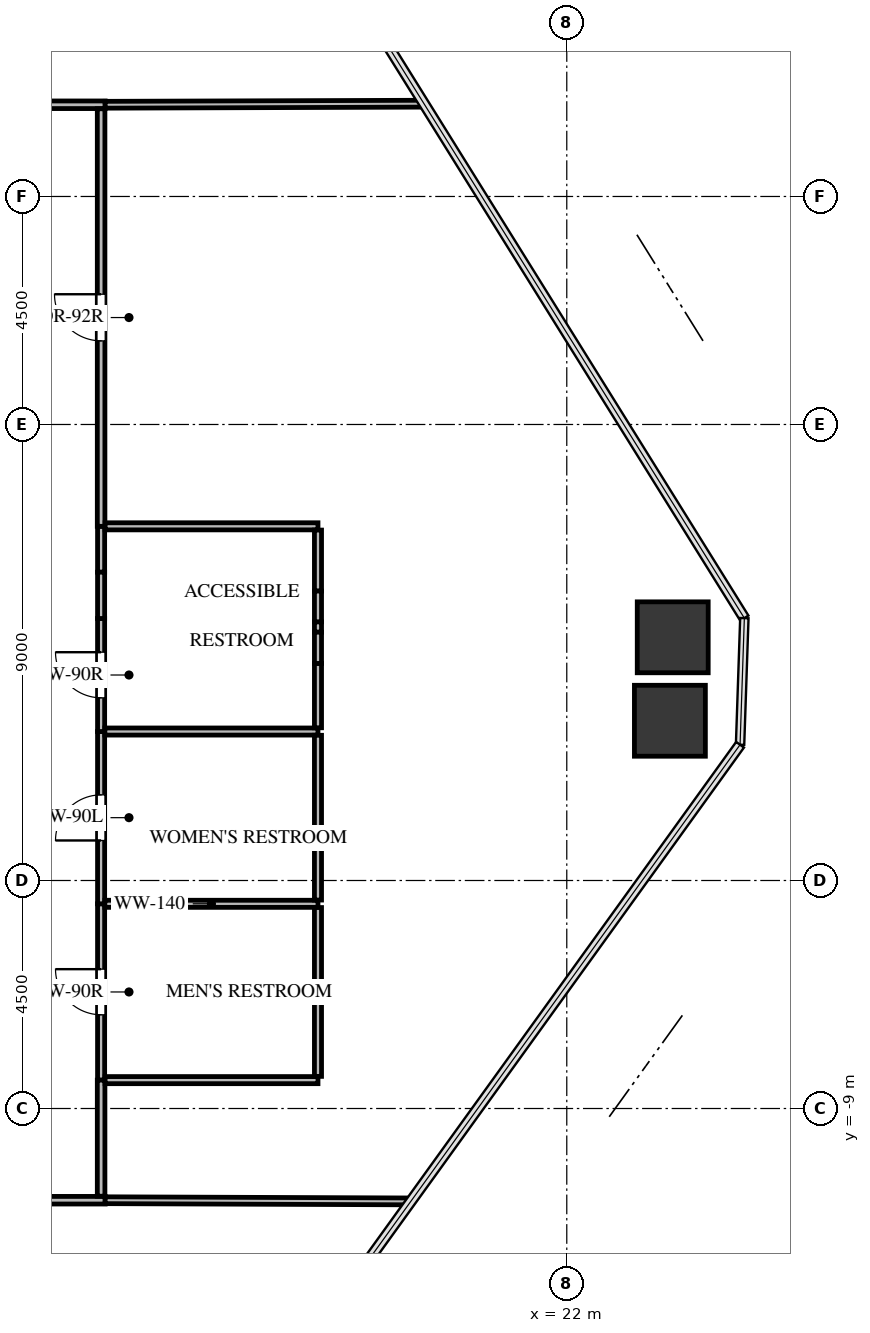
"""IFC4 building model, lengths in metres.
Left out: names, types, materials, properties, quantities, classifications, styles, units other than length and angle.
Written with IfcOpenShell. Run it as: python <this file> out.ifc"""

import sys

from ifc_helpers import new_model, si_unit, direction, frame, frame_2d, origin, origin_2d, place, context, subcontext, project, spatial, rectangle, extrude, source, transform, mapped, element, fill, save


model = new_model("IFC4")
c1 = context("Model", 3, precision=1e-05, world=origin(), true_north=direction((0.0, 1.0)))
c2 = subcontext(c1, "Body", "Model", "MODEL_VIEW")
j1 = project(units=[si_unit("LENGTHUNIT", "METRE"), si_unit("PLANEANGLEUNIT", "RADIAN")], contexts=[c1])
p1 = place(None, origin())
s1 = spatial("IfcSite", under=j1, at=p1, CompositionType="ELEMENT")
p2 = place(p1, origin())
s2 = spatial("IfcBuilding", under=s1, at=p2, CompositionType="ELEMENT")
p3 = place(p2, frame((0.0, 0.0, 52.2)))
s3 = spatial("IfcBuildingStorey", under=s2, at=p3, CompositionType="ELEMENT", Elevation=52.2)
m1 = source(origin(), c2, "Body", "SweptSolid", [
    extrude(rectangle(XDim=1.4, YDim=1.4, at=origin_2d()), origin(), (0.0, 0.0, 1.0), 3.3),
])
for number, where, z_axis, x_axis in (
    (1, (24.091, 0.3, -0.24), (0.0, 0.0, 1.0), (1.0, 0.0, 0.0)),
    (2, (24.035, -1.347, -0.24), (0.0, 0.0, 1.0), (1.0, 0.0, 0.0)),
):
    element("IfcColumn", number, at=place(p3, frame(where, z_axis=z_axis, x_axis=x_axis)), inside=s3, PredefinedType="COLUMN", context=c2, shape_type="MappedRepresentation", body=[
        mapped(m1, transform((0.0, 0.0, 0.0), x_axis=(1.0, 0.0, 0.0), y_axis=(0.0, 1.0, 0.0), z_axis=(0.0, 0.0, 1.0), scale=1.0)),
    ])
p4 = place(p3, frame((12.81, -8.44, 0.0), z_axis=(0.0, 0.0, 1.0), x_axis=(0.0, 1.0, 0.0)))
e3 = element("IfcWall", 3, at=p4, inside=s3, PredefinedType="PARTITIONING", context=c2, shape_type="SweptSolid", body=[
    extrude(rectangle(XDim=3.48, YDim=0.14, at=frame_2d((1.74, 0.0))), origin(), (0.0, 0.0, 1.0), 3.045),
])
p5 = place(p4, frame((1.29, 0.0, 0.0)))
e4 = element("IfcOpeningElement", 4, at=p5, cuts=e3, PredefinedType="OPENING", context=c2, shape_type="SweptSolid", body=[
    extrude(rectangle(XDim=0.9, YDim=2.05, at=frame_2d((0.45, 1.025))), frame((0.0, 0.08, 0.0), z_axis=(0.0, -1.0, 0.0), x_axis=(1.0, 0.0, 0.0)), (0.0, 0.0, 1.0), 0.16),
])
p6 = place(p3, frame((12.81, -4.96, 0.0), z_axis=(0.0, 0.0, 1.0), x_axis=(0.0, 1.0, 0.0)))
e5 = element("IfcWall", 5, at=p6, inside=s3, PredefinedType="PARTITIONING", context=c2, shape_type="SweptSolid", body=[
    extrude(rectangle(XDim=3.4, YDim=0.14, at=frame_2d((1.7, 0.0))), origin(), (0.0, 0.0, 1.0), 3.045),
])
p7 = place(p6, frame((1.25, 0.0, 0.0)))
e6 = element("IfcOpeningElement", 6, at=p7, cuts=e5, PredefinedType="OPENING", context=c2, shape_type="SweptSolid", body=[
    extrude(rectangle(XDim=0.9, YDim=2.05, at=frame_2d((0.45, 1.025))), frame((0.0, 0.08, 0.0), z_axis=(0.0, -1.0, 0.0), x_axis=(1.0, 0.0, 0.0)), (0.0, 0.0, 1.0), 0.16),
])
p8 = place(p3, frame((12.81, -1.56, 0.0), z_axis=(0.0, 0.0, 1.0), x_axis=(0.0, 1.0, 0.0)))
e7 = element("IfcWall", 7, at=p8, inside=s3, PredefinedType="PARTITIONING", context=c2, shape_type="SweptSolid", body=[
    extrude(rectangle(XDim=2.231, YDim=0.14, at=frame_2d((1.116, 0.0))), origin(), (0.0, 0.0, 1.0), 3.045),
])
p9 = place(p8, frame((0.666, 0.0, 0.0)))
e8 = element("IfcOpeningElement", 8, at=p9, cuts=e7, PredefinedType="OPENING", context=c2, shape_type="SweptSolid", body=[
    extrude(rectangle(XDim=0.9, YDim=2.05, at=frame_2d((0.45, 1.025))), frame((0.0, 0.08, 0.0), z_axis=(0.0, -1.0, 0.0), x_axis=(1.0, 0.0, 0.0)), (0.0, 0.0, 1.0), 0.16),
])
p10 = place(p3, frame((12.81, 1.585, 0.0), z_axis=(0.0, 0.0, 1.0), x_axis=(0.0, 1.0, 0.0)))
e9 = element("IfcWall", 9, at=p10, inside=s3, PredefinedType="PARTITIONING", context=c2, shape_type="SweptSolid", body=[
    extrude(rectangle(XDim=0.905, YDim=0.14, at=frame_2d((0.453, 0.0))), origin(), (0.0, 0.0, 1.0), 3.045),
])
p11 = place(p3, frame((12.81, 0.671, 0.0), z_axis=(0.0, 0.0, 1.0), x_axis=(0.0, 1.0, 0.0)))
e10 = element("IfcWall", 10, at=p11, inside=s3, PredefinedType="PARTITIONING", context=c2, shape_type="SweptSolid", body=[
    extrude(rectangle(XDim=0.914, YDim=0.14, at=frame_2d((0.457, 0.0))), origin(), (0.0, 0.0, 1.0), 2.13),
])
p12 = place(p3, frame((12.89, 10.81, 0.0), z_axis=(0.0, 0.0, 1.0), x_axis=(-1.0, 0.0, 0.0)))
e11 = element("IfcWall", 11, at=p12, inside=s3, PredefinedType="PARTITIONING", context=c2, shape_type="SweptSolid", body=[
    extrude(rectangle(XDim=1.847, YDim=0.15, at=frame_2d((0.924, 0.0))), origin(), (0.0, 0.0, 1.0), 3.045),
])
p13 = place(p3, frame((5.817, -10.81, 0.0), z_axis=(0.0, 0.0, 1.0), x_axis=(1.0, 0.0, 0.0)))
e12 = element("IfcWall", 12, at=p13, inside=s3, PredefinedType="PARTITIONING", context=c2, shape_type="SweptSolid", body=[
    extrude(rectangle(XDim=7.073, YDim=0.15, at=frame_2d((3.536, 0.0))), origin(), (0.0, 0.0, 1.0), 2.13),
])
p14 = place(p13, frame((3.086, 0.0, 0.0)))
e13 = element("IfcOpeningElement", 13, at=p14, cuts=e12, PredefinedType="OPENING", context=c2, shape_type="SweptSolid", body=[
    extrude(rectangle(XDim=0.9, YDim=2.05, at=frame_2d((0.45, 1.025))), frame((0.0, 0.085, 0.0), z_axis=(0.0, -1.0, 0.0), x_axis=(1.0, 0.0, 0.0)), (0.0, 0.0, 1.0), 0.17),
])
p15 = place(p3, frame((12.81, 2.49, 0.0), z_axis=(0.0, 0.0, 1.0), x_axis=(0.0, 1.0, 0.0)))
e14 = element("IfcWall", 14, at=p15, inside=s3, PredefinedType="PARTITIONING", context=c2, shape_type="SweptSolid", body=[
    extrude(rectangle(XDim=8.241, YDim=0.15, at=frame_2d((4.121, 0.0))), origin(), (0.0, 0.0, 1.0), 3.045),
])
p16 = place(p15, frame((3.66, 0.0, 0.0)))
e15 = element("IfcOpeningElement", 15, at=p16, cuts=e14, PredefinedType="OPENING", context=c2, shape_type="SweptSolid", body=[
    extrude(rectangle(XDim=0.92, YDim=2.1, at=frame_2d((0.46, 1.05))), frame((0.0, 0.085, 0.0), z_axis=(0.0, -1.0, 0.0), x_axis=(1.0, 0.0, 0.0)), (0.0, 0.0, 1.0), 0.17),
])
p17 = place(p3, frame((12.81, -10.731, 0.0), z_axis=(0.0, 0.0, 1.0), x_axis=(0.0, 1.0, 0.0)))
e16 = element("IfcWall", 16, at=p17, inside=s3, PredefinedType="PARTITIONING", context=c2, shape_type="SweptSolid", body=[
    extrude(rectangle(XDim=2.291, YDim=0.15, at=frame_2d((1.146, 0.0))), origin(), (0.0, 0.0, 1.0), 3.045),
])
p18 = place(p3, frame((12.884, -4.96, 0.0), z_axis=(0.0, 0.0, 1.0), x_axis=(1.0, 0.0, 0.0)))
e17 = element("IfcWall", 17, at=p18, inside=s3, PredefinedType="PARTITIONING", context=c2, shape_type="SweptSolid", body=[
    extrude(rectangle(XDim=4.206, YDim=0.14, at=frame_2d((2.103, 0.0))), origin(), (0.0, 0.0, 1.0), 3.045),
])
p19 = place(p3, frame((17.09, -8.44, 0.0), z_axis=(0.0, 0.0, 1.0), x_axis=(-1.0, 0.0, 0.0)))
e18 = element("IfcWall", 18, at=p19, inside=s3, PredefinedType="PARTITIONING", context=c2, shape_type="SweptSolid", body=[
    extrude(rectangle(XDim=4.201, YDim=0.14, at=frame_2d((2.101, 0.0))), origin(), (0.0, 0.0, 1.0), 3.045),
])
p20 = place(p3, frame((17.09, -5.034, 0.0), z_axis=(0.0, 0.0, 1.0), x_axis=(0.0, -1.0, 0.0)))
e19 = element("IfcWall", 19, at=p20, inside=s3, PredefinedType="PARTITIONING", context=c2, shape_type="SweptSolid", body=[
    extrude(rectangle(XDim=3.332, YDim=0.14, at=frame_2d((1.666, 0.0))), origin(), (0.0, 0.0, 1.0), 3.045),
])
p21 = place(p3, frame((12.884, -1.56, 0.0), z_axis=(0.0, 0.0, 1.0), x_axis=(1.0, 0.0, 0.0)))
e20 = element("IfcWall", 20, at=p21, inside=s3, PredefinedType="PARTITIONING", context=c2, shape_type="SweptSolid", body=[
    extrude(rectangle(XDim=4.206, YDim=0.14, at=frame_2d((2.103, 0.0))), origin(), (0.0, 0.0, 1.0), 3.045),
])
p22 = place(p3, frame((17.09, -1.634, 0.0), z_axis=(0.0, 0.0, 1.0), x_axis=(0.0, -1.0, 0.0)))
e21 = element("IfcWall", 21, at=p22, inside=s3, PredefinedType="PARTITIONING", context=c2, shape_type="SweptSolid", body=[
    extrude(rectangle(XDim=3.252, YDim=0.14, at=frame_2d((1.626, 0.0))), origin(), (0.0, 0.0, 1.0), 3.045),
])
p23 = place(p3, frame((12.889, 2.49, 0.0), z_axis=(0.0, 0.0, 1.0), x_axis=(1.0, 0.0, 0.0)))
e22 = element("IfcWall", 22, at=p23, inside=s3, PredefinedType="PARTITIONING", context=c2, shape_type="SweptSolid", body=[
    extrude(rectangle(XDim=4.201, YDim=0.14, at=frame_2d((2.101, 0.0))), origin(), (0.0, 0.0, 1.0), 3.045),
])
p24 = place(p3, frame((17.09, 2.416, 0.0), z_axis=(0.0, 0.0, 1.0), x_axis=(0.0, -1.0, 0.0)))
e23 = element("IfcWall", 23, at=p24, inside=s3, PredefinedType="PARTITIONING", context=c2, shape_type="SweptSolid", body=[
    extrude(rectangle(XDim=1.204, YDim=0.14, at=frame_2d((0.602, 0.0))), origin(), (0.0, 0.0, 1.0), 3.045),
])
p25 = place(p3, frame((17.09, 0.606, 0.0), z_axis=(0.0, 0.0, 1.0), x_axis=(0.0, -1.0, 0.0)))
e24 = element("IfcWall", 24, at=p25, inside=s3, PredefinedType="PARTITIONING", context=c2, shape_type="SweptSolid", body=[
    extrude(rectangle(XDim=0.205, YDim=0.14, at=frame_2d((0.103, 0.0))), origin(), (0.0, 0.0, 1.0), 3.045),
])
p26 = place(p3, frame((17.09, -0.216, 0.0), z_axis=(0.0, 0.0, 1.0), x_axis=(0.0, -1.0, 0.0)))
e25 = element("IfcWall", 25, at=p26, inside=s3, PredefinedType="PARTITIONING", context=c2, shape_type="SweptSolid", body=[
    extrude(rectangle(XDim=1.27, YDim=0.14, at=frame_2d((0.635, 0.0))), origin(), (0.0, 0.0, 1.0), 3.045),
])
p27 = place(p3, frame((17.09, 1.212, 0.0), z_axis=(0.0, 0.0, 1.0), x_axis=(0.0, -1.0, 0.0)))
e26 = element("IfcWall", 26, at=p27, inside=s3, PredefinedType="PARTITIONING", context=c2, shape_type="SweptSolid", body=[
    extrude(rectangle(XDim=0.606, YDim=0.14, at=frame_2d((0.303, 0.0))), origin(), (0.0, 0.0, 1.0), 2.13),
])
p28 = place(p3, frame((17.09, 0.401, 0.0), z_axis=(0.0, 0.0, 1.0), x_axis=(0.0, -1.0, 0.0)))
e27 = element("IfcWall", 27, at=p28, inside=s3, PredefinedType="PARTITIONING", context=c2, shape_type="SweptSolid", body=[
    extrude(rectangle(XDim=0.617, YDim=0.14, at=frame_2d((0.309, 0.0))), origin(), (0.0, 0.0, 1.0), 2.13),
])
p29 = place(p3, frame((19.182, 10.831, 0.0), z_axis=(0.0, 0.0, 1.0), x_axis=(-0.999994432845, -0.003336806783, 0.0)))
e28 = element("IfcWall", 28, at=p29, inside=s3, PredefinedType="PARTITIONING", context=c2, shape_type="SweptSolid", body=[
    extrude(rectangle(XDim=6.292, YDim=0.135, at=frame_2d((3.146, 0.0))), origin(), (0.0, 0.0, 1.0), 2.38),
])
p30 = place(p3, frame((12.89, -10.81, 0.0), z_axis=(0.0, 0.0, 1.0), x_axis=(0.999992607823, -0.003845035728, 0.0)))
e29 = element("IfcWall", 29, at=p30, inside=s3, PredefinedType="PARTITIONING", context=c2, shape_type="SweptSolid", body=[
    extrude(rectangle(XDim=6.032, YDim=0.135, at=frame_2d((3.016, 0.0))), origin(), (0.0, 0.0, 1.0), 2.38),
])
m2 = source(origin(), c2, "Body", "SweptSolid", [
    extrude(rectangle(XDim=0.9, YDim=2.05, at=frame_2d((0.45, 1.025))), frame((0.0, 0.025, 0.0), z_axis=(0.0, -1.0, 0.0), x_axis=(1.0, 0.0, 0.0)), (0.0, 0.0, 1.0), 0.05),
])
p31 = place(p5, origin())
e30 = element("IfcDoor", 30, at=p31, inside=s3, OperationType="SINGLE_SWING_RIGHT", PredefinedType="DOOR", context=c2, shape_type="MappedRepresentation", body=[
    mapped(m2, transform((0.0, 0.0, 0.0), x_axis=(1.0, 0.0, 0.0), y_axis=(0.0, 1.0, 0.0), z_axis=(0.0, 0.0, 1.0), scale=1.0)),
])
fill(e4, e30)
m3 = source(origin(), c2, "Body", "SweptSolid", [
    extrude(rectangle(XDim=0.9, YDim=2.05, at=frame_2d((0.45, 1.025))), frame((0.0, 0.025, 0.0), z_axis=(0.0, -1.0, 0.0), x_axis=(1.0, 0.0, 0.0)), (0.0, 0.0, 1.0), 0.05),
])
p32 = place(p7, origin())
e31 = element("IfcDoor", 31, at=p32, inside=s3, OperationType="SINGLE_SWING_LEFT", PredefinedType="DOOR", context=c2, shape_type="MappedRepresentation", body=[
    mapped(m3, transform((0.0, 0.0, 0.0), x_axis=(1.0, 0.0, 0.0), y_axis=(0.0, 1.0, 0.0), z_axis=(0.0, 0.0, 1.0), scale=1.0)),
])
fill(e6, e31)
p33 = place(p9, origin())
e32 = element("IfcDoor", 32, at=p33, inside=s3, OperationType="SINGLE_SWING_RIGHT", PredefinedType="DOOR", context=c2, shape_type="MappedRepresentation", body=[
    mapped(m2, transform((0.0, 0.0, 0.0), x_axis=(1.0, 0.0, 0.0), y_axis=(0.0, 1.0, 0.0), z_axis=(0.0, 0.0, 1.0), scale=1.0)),
])
fill(e8, e32)
m4 = source(origin(), c2, "Body", "SweptSolid", [
    extrude(rectangle(XDim=0.92, YDim=2.1, at=frame_2d((0.46, 1.05))), frame((0.0, 0.025, 0.0), z_axis=(0.0, -1.0, 0.0), x_axis=(1.0, 0.0, 0.0)), (0.0, 0.0, 1.0), 0.05),
])
p34 = place(p16, origin())
e33 = element("IfcDoor", 33, at=p34, inside=s3, OperationType="SINGLE_SWING_RIGHT", PredefinedType="DOOR", context=c2, shape_type="MappedRepresentation", body=[
    mapped(m4, transform((0.0, 0.0, 0.0), x_axis=(1.0, 0.0, 0.0), y_axis=(0.0, 1.0, 0.0), z_axis=(0.0, 0.0, 1.0), scale=1.0)),
])
fill(e15, e33)
save(model, sys.argv[1])
